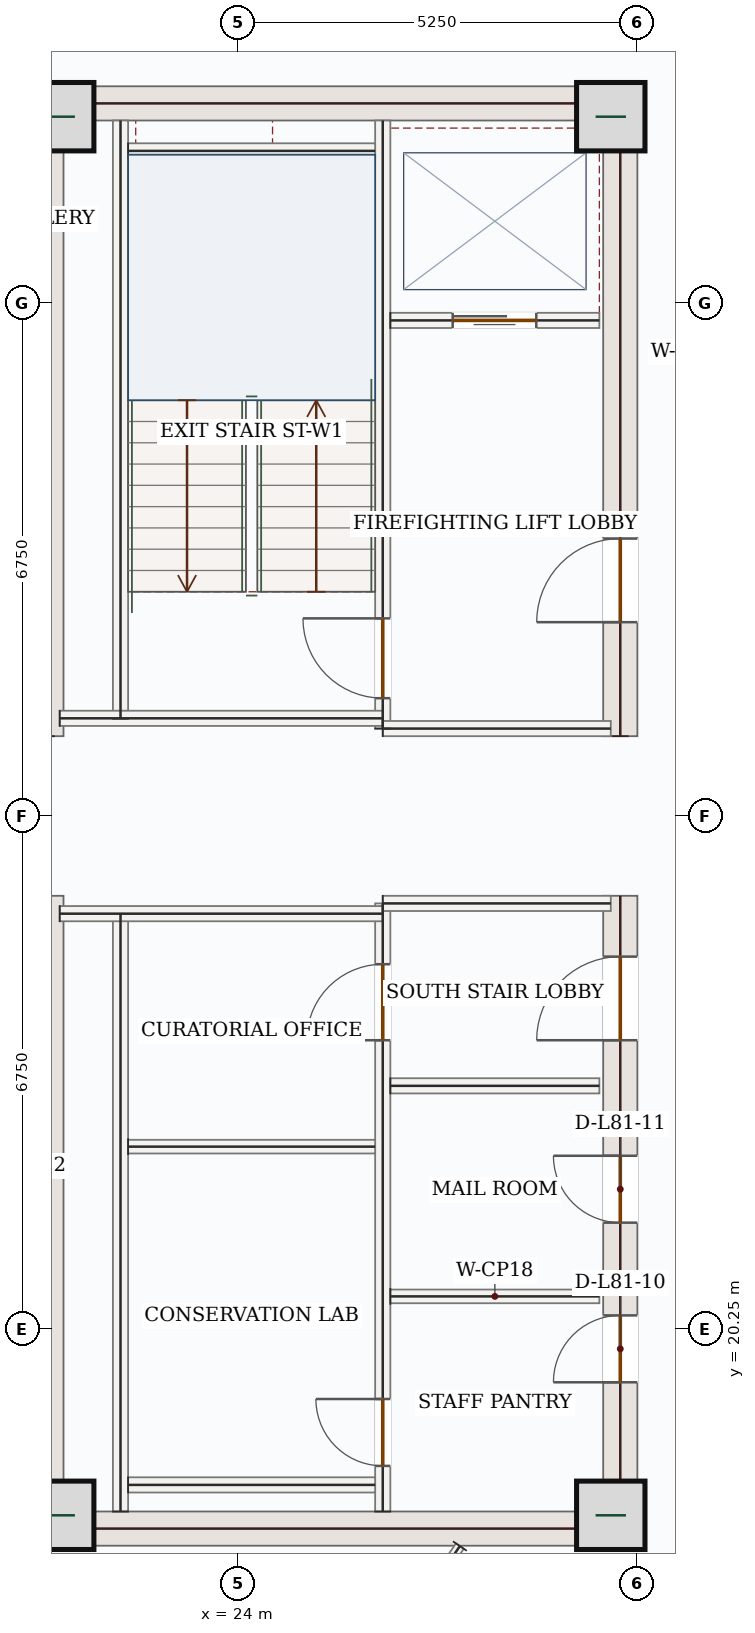
"""IFC4 building model, lengths in metres.
Left out: names, types, materials, properties, quantities, classifications, styles, units other than length and angle.
Written with IfcOpenShell. Run it as: python <this file> out.ifc"""

import sys

from ifc_helpers import new_model, si_unit, direction, frame, frame_2d, origin, origin_2d, place, context, subcontext, project, spatial, rectangle, extrude, source, transform, mapped, element, fill, save


model = new_model("IFC4")
c1 = context("Model", 3, precision=1e-05, world=origin(), true_north=direction((0.0, 1.0)))
c2 = subcontext(c1, "Body", "Model", "MODEL_VIEW")
j1 = project(units=[si_unit("LENGTHUNIT", "METRE"), si_unit("PLANEANGLEUNIT", "RADIAN")], contexts=[c1])
p1 = place(None, origin())
s1 = spatial("IfcSite", under=j1, at=p1, CompositionType="ELEMENT")
p2 = place(p1, origin())
s2 = spatial("IfcBuilding", under=s1, at=p2, CompositionType="ELEMENT")
p3 = place(p2, frame((0.0, 0.0, 334.8)))
s3 = spatial("IfcBuildingStorey", under=s2, at=p3, CompositionType="ELEMENT", Elevation=334.8)
m1 = source(origin(), c2, "Body", "SweptSolid", [
    extrude(rectangle(XDim=8.55, YDim=0.45, at=frame_2d((4.275, 0.0))), origin(), (0.0, 0.0, 1.0), 3.5),
])
for number, where, z_axis, x_axis in (
    (1, (21.475, 17.4, 0.0), (0.0, 0.0, 1.0), (0.0, 1.0, 0.0)),
    (2, (21.475, 28.05, 0.0), (0.0, 0.0, 1.0), (0.0, 1.0, 0.0)),
):
    element("IfcWall", number, at=place(p3, frame(where, z_axis=z_axis, x_axis=x_axis)), inside=s3, PredefinedType="SHEAR", context=c2, shape_type="MappedRepresentation", body=[
        mapped(m1, transform((0.0, 0.0, 0.0), x_axis=(1.0, 0.0, 0.0), y_axis=(0.0, 1.0, 0.0), z_axis=(0.0, 0.0, 1.0), scale=1.0)),
    ])
p4 = place(p3, frame((29.025, 17.4, 0.0), z_axis=(0.0, 0.0, 1.0), x_axis=(0.0, 1.0, 0.0)))
e3 = element("IfcWall", 3, at=p4, inside=s3, PredefinedType="SHEAR", context=c2, shape_type="SweptSolid", body=[
    extrude(rectangle(XDim=8.55, YDim=0.45, at=frame_2d((4.275, 0.0))), origin(), (0.0, 0.0, 1.0), 3.5),
])
p5 = place(p4, frame((6.65, 0.0, 0.0)))
e4 = element("IfcOpeningElement", 4, at=p5, cuts=e3, PredefinedType="OPENING", context=c2, shape_type="SweptSolid", body=[
    extrude(rectangle(XDim=1.1, YDim=2.2, at=frame_2d((0.55, 1.1))), frame((0.0, 0.235, 0.0), z_axis=(0.0, -1.0, 0.0), x_axis=(1.0, 0.0, 0.0)), (0.0, 0.0, 1.0), 0.47),
])
p6 = place(p4, frame((2.15, 0.0, 0.0)))
e5 = element("IfcOpeningElement", 5, at=p6, cuts=e3, PredefinedType="OPENING", context=c2, shape_type="SweptSolid", body=[
    extrude(rectangle(XDim=0.88, YDim=2.1, at=frame_2d((0.44, 1.05))), frame((0.0, 0.235, 0.0), z_axis=(0.0, -1.0, 0.0), x_axis=(1.0, 0.0, 0.0)), (0.0, 0.0, 1.0), 0.47),
])
p7 = place(p4, frame((4.25, 0.0, 0.0)))
e6 = element("IfcOpeningElement", 6, at=p7, cuts=e3, PredefinedType="OPENING", context=c2, shape_type="SweptSolid", body=[
    extrude(rectangle(XDim=0.88, YDim=2.1, at=frame_2d((0.44, 1.05))), frame((0.0, 0.235, 0.0), z_axis=(0.0, -1.0, 0.0), x_axis=(1.0, 0.0, 0.0)), (0.0, 0.0, 1.0), 0.47),
])
p8 = place(p3, frame((29.025, 28.05, 0.0), z_axis=(0.0, 0.0, 1.0), x_axis=(0.0, 1.0, 0.0)))
e7 = element("IfcWall", 7, at=p8, inside=s3, PredefinedType="SHEAR", context=c2, shape_type="SweptSolid", body=[
    extrude(rectangle(XDim=8.55, YDim=0.45, at=frame_2d((4.275, 0.0))), origin(), (0.0, 0.0, 1.0), 3.5),
])
p9 = place(p8, frame((1.5, 0.0, 0.0)))
e8 = element("IfcOpeningElement", 8, at=p9, cuts=e7, PredefinedType="OPENING", context=c2, shape_type="SweptSolid", body=[
    extrude(rectangle(XDim=1.1, YDim=2.2, at=frame_2d((0.55, 1.1))), frame((0.0, 0.235, 0.0), z_axis=(0.0, -1.0, 0.0), x_axis=(1.0, 0.0, 0.0)), (0.0, 0.0, 1.0), 0.47),
])
m2 = source(origin(), c2, "Body", "SweptSolid", [
    extrude(rectangle(XDim=7.1, YDim=0.45, at=frame_2d((3.55, 0.0))), origin(), (0.0, 0.0, 1.0), 3.5),
])
for number, where, z_axis, x_axis in (
    (9, (21.7, 17.625, 0.0), (0.0, 0.0, 1.0), (1.0, 0.0, 0.0)),
    (10, (21.7, 36.375, 0.0), (0.0, 0.0, 1.0), (1.0, 0.0, 0.0)),
):
    element("IfcWall", number, at=place(p3, frame(where, z_axis=z_axis, x_axis=x_axis)), inside=s3, PredefinedType="SHEAR", context=c2, shape_type="MappedRepresentation", body=[
        mapped(m2, transform((0.0, 0.0, 0.0), x_axis=(1.0, 0.0, 0.0), y_axis=(0.0, 1.0, 0.0), z_axis=(0.0, 0.0, 1.0), scale=1.0)),
    ])
m3 = source(origin(), c2, "Body", "SweptSolid", [
    extrude(rectangle(XDim=0.9, YDim=0.9, at=origin_2d()), origin(), (0.0, 0.0, 1.0), 3.75),
])
for number, where, z_axis, x_axis in (
    (11, (21.65, 17.8, 0.0), (0.0, 0.0, 1.0), (1.0, 0.0, 0.0)),
    (12, (28.9, 17.8, 0.0), (0.0, 0.0, 1.0), (1.0, 0.0, 0.0)),
    (13, (21.65, 36.2, 0.0), (0.0, 0.0, 1.0), (1.0, 0.0, 0.0)),
    (14, (28.9, 36.2, 0.0), (0.0, 0.0, 1.0), (1.0, 0.0, 0.0)),
):
    element("IfcColumn", number, at=place(p3, frame(where, z_axis=z_axis, x_axis=x_axis)), inside=s3, PredefinedType="COLUMN", context=c2, shape_type="MappedRepresentation", body=[
        mapped(m3, transform((0.0, 0.0, 0.0), x_axis=(1.0, 0.0, 0.0), y_axis=(0.0, 1.0, 0.0), z_axis=(0.0, 0.0, 1.0), scale=1.0)),
    ])
m4 = source(origin(), c2, "Body", "SweptSolid", [
    extrude(rectangle(XDim=3.709, YDim=0.28, at=frame_2d((1.855, 0.0))), origin(), (0.0, 0.0, 1.0), 3.5),
])
p10 = place(p3, frame((18.94, 35.542, 0.0), z_axis=(0.0, 0.0, 1.0), x_axis=(0.707106781187, 0.707106781187, 0.0)))
e15 = element("IfcWall", 15, at=p10, inside=s3, PredefinedType="SOLIDWALL", context=c2, shape_type="MappedRepresentation", body=[
    mapped(m4, transform((0.0, 0.0, 0.0), x_axis=(1.0, 0.0, 0.0), y_axis=(0.0, 1.0, 0.0), z_axis=(0.0, 0.0, 1.0), scale=1.0)),
])
m5 = source(origin(), c2, "Body", "SweptSolid", [
    extrude(rectangle(XDim=7.87, YDim=0.2, at=frame_2d((3.935, 0.0))), origin(), (0.0, 0.0, 1.0), 3.5),
])
for number, where, z_axis, x_axis in (
    (16, (22.45, 17.85, 0.0), (0.0, 0.0, 1.0), (0.0, 1.0, 0.0)),
    (17, (22.45, 28.28, 0.0), (0.0, 0.0, 1.0), (0.0, 1.0, 0.0)),
):
    element("IfcWall", number, at=place(p3, frame(where, z_axis=z_axis, x_axis=x_axis)), inside=s3, PredefinedType="SOLIDWALL", context=c2, shape_type="MappedRepresentation", body=[
        mapped(m5, transform((0.0, 0.0, 0.0), x_axis=(1.0, 0.0, 0.0), y_axis=(0.0, 1.0, 0.0), z_axis=(0.0, 0.0, 1.0), scale=1.0)),
    ])
p11 = place(p3, frame((25.9, 17.85, 0.0), z_axis=(0.0, 0.0, 1.0), x_axis=(0.0, 1.0, 0.0)))
e18 = element("IfcWall", 18, at=p11, inside=s3, PredefinedType="SOLIDWALL", context=c2, shape_type="SweptSolid", body=[
    extrude(rectangle(XDim=8.0, YDim=0.2, at=frame_2d((4.0, 0.0))), origin(), (0.0, 0.0, 1.0), 3.5),
])
p12 = place(p11, frame((6.2, 0.0, 0.0)))
e19 = element("IfcOpeningElement", 19, at=p12, cuts=e18, PredefinedType="OPENING", context=c2, shape_type="SweptSolid", body=[
    extrude(rectangle(XDim=1.0, YDim=2.15, at=frame_2d((0.5, 1.075))), frame((0.0, 0.11, 0.0), z_axis=(0.0, -1.0, 0.0), x_axis=(1.0, 0.0, 0.0)), (0.0, 0.0, 1.0), 0.22),
])
p13 = place(p11, frame((0.6, 0.0, 0.0)))
e20 = element("IfcOpeningElement", 20, at=p13, cuts=e18, PredefinedType="OPENING", context=c2, shape_type="SweptSolid", body=[
    extrude(rectangle(XDim=0.88, YDim=2.1, at=frame_2d((0.44, 1.05))), frame((0.0, 0.11, 0.0), z_axis=(0.0, -1.0, 0.0), x_axis=(1.0, 0.0, 0.0)), (0.0, 0.0, 1.0), 0.22),
])
p14 = place(p3, frame((25.9, 28.15, 0.0), z_axis=(0.0, 0.0, 1.0), x_axis=(0.0, 1.0, 0.0)))
e21 = element("IfcWall", 21, at=p14, inside=s3, PredefinedType="SOLIDWALL", context=c2, shape_type="SweptSolid", body=[
    extrude(rectangle(XDim=8.0, YDim=0.2, at=frame_2d((4.0, 0.0))), origin(), (0.0, 0.0, 1.0), 3.5),
])
p15 = place(p14, frame((0.4, 0.0, 0.0)))
e22 = element("IfcOpeningElement", 22, at=p15, cuts=e21, PredefinedType="OPENING", context=c2, shape_type="SweptSolid", body=[
    extrude(rectangle(XDim=1.05, YDim=2.15, at=frame_2d((0.525, 1.075))), frame((0.0, 0.11, 0.0), z_axis=(0.0, -1.0, 0.0), x_axis=(1.0, 0.0, 0.0)), (0.0, 0.0, 1.0), 0.22),
])
m6 = source(origin(), c2, "Body", "SweptSolid", [
    extrude(rectangle(XDim=4.25, YDim=0.2, at=frame_2d((2.125, 0.0))), origin(), (0.0, 0.0, 1.0), 3.5),
])
p16 = place(p3, frame((21.65, 25.715, 0.0), z_axis=(0.0, 0.0, 1.0), x_axis=(1.0, 0.0, 0.0)))
e23 = element("IfcWall", 23, at=p16, inside=s3, PredefinedType="SOLIDWALL", context=c2, shape_type="MappedRepresentation", body=[
    mapped(m6, transform((0.0, 0.0, 0.0), x_axis=(1.0, 0.0, 0.0), y_axis=(0.0, 1.0, 0.0), z_axis=(0.0, 0.0, 1.0), scale=1.0)),
])
m7 = source(origin(), c2, "Body", "SweptSolid", [
    extrude(rectangle(XDim=3.0, YDim=0.2, at=frame_2d((1.5, 0.0))), origin(), (0.0, 0.0, 1.0), 3.5),
])
p17 = place(p3, frame((25.9, 25.85, 0.0), z_axis=(0.0, 0.0, 1.0), x_axis=(1.0, 0.0, 0.0)))
e24 = element("IfcWall", 24, at=p17, inside=s3, PredefinedType="SOLIDWALL", context=c2, shape_type="MappedRepresentation", body=[
    mapped(m7, transform((0.0, 0.0, 0.0), x_axis=(1.0, 0.0, 0.0), y_axis=(0.0, 1.0, 0.0), z_axis=(0.0, 0.0, 1.0), scale=1.0)),
])
p18 = place(p3, frame((21.65, 28.285, 0.0), z_axis=(0.0, 0.0, 1.0), x_axis=(1.0, 0.0, 0.0)))
e25 = element("IfcWall", 25, at=p18, inside=s3, PredefinedType="SOLIDWALL", context=c2, shape_type="MappedRepresentation", body=[
    mapped(m6, transform((0.0, 0.0, 0.0), x_axis=(1.0, 0.0, 0.0), y_axis=(0.0, 1.0, 0.0), z_axis=(0.0, 0.0, 1.0), scale=1.0)),
])
p19 = place(p3, frame((25.9, 28.15, 0.0), z_axis=(0.0, 0.0, 1.0), x_axis=(1.0, 0.0, 0.0)))
e26 = element("IfcWall", 26, at=p19, inside=s3, PredefinedType="SOLIDWALL", context=c2, shape_type="MappedRepresentation", body=[
    mapped(m7, transform((0.0, 0.0, 0.0), x_axis=(1.0, 0.0, 0.0), y_axis=(0.0, 1.0, 0.0), z_axis=(0.0, 0.0, 1.0), scale=1.0)),
])
m8 = source(origin(), c2, "Body", "SweptSolid", [
    extrude(rectangle(XDim=3.25, YDim=0.2, at=frame_2d((1.625, 0.0))), origin(), (0.0, 0.0, 1.0), 3.5),
])
for number, where, z_axis, x_axis in (
    (27, (22.55, 35.75, 0.0), (0.0, 0.0, 1.0), (1.0, 0.0, 0.0)),
    (28, (22.55, 18.2, 0.0), (0.0, 0.0, 1.0), (1.0, 0.0, 0.0)),
):
    element("IfcWall", number, at=place(p3, frame(where, z_axis=z_axis, x_axis=x_axis)), inside=s3, PredefinedType="SOLIDWALL", context=c2, shape_type="MappedRepresentation", body=[
        mapped(m8, transform((0.0, 0.0, 0.0), x_axis=(1.0, 0.0, 0.0), y_axis=(0.0, 1.0, 0.0), z_axis=(0.0, 0.0, 1.0), scale=1.0)),
    ])
m9 = source(origin(), c2, "Body", "SweptSolid", [
    extrude(rectangle(XDim=3.25, YDim=0.18, at=frame_2d((1.625, 0.0))), origin(), (0.0, 0.0, 1.0), 3.5),
])
p20 = place(p3, frame((22.55, 22.65, 0.0), z_axis=(0.0, 0.0, 1.0), x_axis=(1.0, 0.0, 0.0)))
e29 = element("IfcWall", 29, at=p20, inside=s3, PredefinedType="PARTITIONING", context=c2, shape_type="MappedRepresentation", body=[
    mapped(m9, transform((0.0, 0.0, 0.0), x_axis=(1.0, 0.0, 0.0), y_axis=(0.0, 1.0, 0.0), z_axis=(0.0, 0.0, 1.0), scale=1.0)),
])
p21 = place(p3, frame((26.0, 33.52, 0.0), z_axis=(0.0, 0.0, 1.0), x_axis=(1.0, 0.0, 0.0)))
e30 = element("IfcWall", 30, at=p21, inside=s3, PredefinedType="SOLIDWALL", context=c2, shape_type="SweptSolid", body=[
    extrude(rectangle(XDim=2.75, YDim=0.2, at=frame_2d((1.375, 0.0))), origin(), (0.0, 0.0, 1.0), 3.5),
])
p22 = place(p21, frame((0.82, 0.0, 0.0)))
e31 = element("IfcOpeningElement", 31, at=p22, cuts=e30, PredefinedType="OPENING", context=c2, shape_type="SweptSolid", body=[
    extrude(rectangle(XDim=1.1, YDim=2.15, at=frame_2d((0.55, 1.075))), frame((0.0, 0.11, 0.0), z_axis=(0.0, -1.0, 0.0), x_axis=(1.0, 0.0, 0.0)), (0.0, 0.0, 1.0), 0.22),
])
m10 = source(origin(), c2, "Body", "SweptSolid", [
    extrude(rectangle(XDim=2.75, YDim=0.2, at=frame_2d((1.375, 0.0))), origin(), (0.0, 0.0, 1.0), 3.5),
])
p23 = place(p3, frame((26.0, 23.45, 0.0), z_axis=(0.0, 0.0, 1.0), x_axis=(1.0, 0.0, 0.0)))
e32 = element("IfcWall", 32, at=p23, inside=s3, PredefinedType="SOLIDWALL", context=c2, shape_type="MappedRepresentation", body=[
    mapped(m10, transform((0.0, 0.0, 0.0), x_axis=(1.0, 0.0, 0.0), y_axis=(0.0, 1.0, 0.0), z_axis=(0.0, 0.0, 1.0), scale=1.0)),
])
m11 = source(origin(), c2, "Body", "SweptSolid", [
    extrude(rectangle(XDim=2.75, YDim=0.18, at=frame_2d((1.375, 0.0))), origin(), (0.0, 0.0, 1.0), 3.5),
])
p24 = place(p3, frame((26.0, 20.68, 0.0), z_axis=(0.0, 0.0, 1.0), x_axis=(1.0, 0.0, 0.0)))
e33 = element("IfcWall", 33, at=p24, inside=s3, PredefinedType="PARTITIONING", context=c2, shape_type="MappedRepresentation", body=[
    mapped(m11, transform((0.0, 0.0, 0.0), x_axis=(1.0, 0.0, 0.0), y_axis=(0.0, 1.0, 0.0), z_axis=(0.0, 0.0, 1.0), scale=1.0)),
])
m12 = source(origin(), c2, "Body", "SweptSolid", [
    extrude(rectangle(XDim=2.511, YDim=0.125, at=frame_2d((1.255, 0.0))), origin(), (0.0, 0.0, 1.0), 3.5),
])
p25 = place(p3, frame((26.915, 17.395, 0.0), z_axis=(0.0, 0.0, 1.0), x_axis=(-0.564980194272, -0.825104466162, 0.0)))
e34 = element("IfcWall", 34, at=p25, inside=s3, PredefinedType="PARTITIONING", context=c2, shape_type="MappedRepresentation", body=[
    mapped(m12, transform((0.0, 0.0, 0.0), x_axis=(1.0, 0.0, 0.0), y_axis=(0.0, 1.0, 0.0), z_axis=(0.0, 0.0, 1.0), scale=1.0)),
])
m13 = source(origin(), c2, "Body", "SweptSolid", [
    extrude(rectangle(XDim=1.05, YDim=2.15, at=frame_2d((0.525, 1.075))), frame((0.0, 0.025, 0.0), z_axis=(0.0, -1.0, 0.0), x_axis=(1.0, 0.0, 0.0)), (0.0, 0.0, 1.0), 0.05),
])
p26 = place(p15, origin())
e35 = element("IfcDoor", 35, at=p26, inside=s3, OperationType="SINGLE_SWING_RIGHT", PredefinedType="DOOR", context=c2, shape_type="MappedRepresentation", body=[
    mapped(m13, transform((0.0, 0.0, 0.0), x_axis=(1.0, 0.0, 0.0), y_axis=(0.0, 1.0, 0.0), z_axis=(0.0, 0.0, 1.0), scale=1.0)),
])
fill(e22, e35)
m14 = source(origin(), c2, "Body", "SweptSolid", [
    extrude(rectangle(XDim=1.0, YDim=2.15, at=frame_2d((0.5, 1.075))), frame((0.0, 0.025, 0.0), z_axis=(0.0, -1.0, 0.0), x_axis=(1.0, 0.0, 0.0)), (0.0, 0.0, 1.0), 0.05),
])
p27 = place(p12, origin())
e36 = element("IfcDoor", 36, at=p27, inside=s3, OperationType="SINGLE_SWING_LEFT", PredefinedType="DOOR", context=c2, shape_type="MappedRepresentation", body=[
    mapped(m14, transform((0.0, 0.0, 0.0), x_axis=(1.0, 0.0, 0.0), y_axis=(0.0, 1.0, 0.0), z_axis=(0.0, 0.0, 1.0), scale=1.0)),
])
fill(e19, e36)
m15 = source(origin(), c2, "Body", "SweptSolid", [
    extrude(rectangle(XDim=0.88, YDim=2.1, at=frame_2d((0.44, 1.05))), frame((0.0, 0.025, 0.0), z_axis=(0.0, -1.0, 0.0), x_axis=(1.0, 0.0, 0.0)), (0.0, 0.0, 1.0), 0.05),
])
p28 = place(p13, origin())
e37 = element("IfcDoor", 37, at=p28, inside=s3, OperationType="SINGLE_SWING_RIGHT", PredefinedType="DOOR", context=c2, shape_type="MappedRepresentation", body=[
    mapped(m15, transform((0.0, 0.0, 0.0), x_axis=(1.0, 0.0, 0.0), y_axis=(0.0, 1.0, 0.0), z_axis=(0.0, 0.0, 1.0), scale=1.0)),
])
fill(e20, e37)
m16 = source(origin(), c2, "Body", "SweptSolid", [
    extrude(rectangle(XDim=1.1, YDim=2.15, at=frame_2d((0.55, 1.075))), frame((0.0, 0.025, 0.0), z_axis=(0.0, -1.0, 0.0), x_axis=(1.0, 0.0, 0.0)), (0.0, 0.0, 1.0), 0.05),
])
p29 = place(p22, origin())
e38 = element("IfcDoor", 38, at=p29, inside=s3, OperationType="DOUBLE_DOOR_SLIDING", PredefinedType="DOOR", context=c2, shape_type="MappedRepresentation", body=[
    mapped(m16, transform((0.0, 0.0, 0.0), x_axis=(1.0, 0.0, 0.0), y_axis=(0.0, 1.0, 0.0), z_axis=(0.0, 0.0, 1.0), scale=1.0)),
])
fill(e31, e38)
m17 = source(origin(), c2, "Body", "SweptSolid", [
    extrude(rectangle(XDim=1.1, YDim=2.2, at=frame_2d((0.55, 1.1))), frame((0.0, 0.025, 0.0), z_axis=(0.0, -1.0, 0.0), x_axis=(1.0, 0.0, 0.0)), (0.0, 0.0, 1.0), 0.05),
])
p30 = place(p9, origin())
e39 = element("IfcDoor", 39, at=p30, inside=s3, OperationType="SINGLE_SWING_LEFT", PredefinedType="DOOR", context=c2, shape_type="MappedRepresentation", body=[
    mapped(m17, transform((0.0, 0.0, 0.0), x_axis=(1.0, 0.0, 0.0), y_axis=(0.0, 1.0, 0.0), z_axis=(0.0, 0.0, 1.0), scale=1.0)),
])
fill(e8, e39)
p31 = place(p5, origin())
e40 = element("IfcDoor", 40, at=p31, inside=s3, OperationType="SINGLE_SWING_LEFT", PredefinedType="DOOR", context=c2, shape_type="MappedRepresentation", body=[
    mapped(m17, transform((0.0, 0.0, 0.0), x_axis=(1.0, 0.0, 0.0), y_axis=(0.0, 1.0, 0.0), z_axis=(0.0, 0.0, 1.0), scale=1.0)),
])
fill(e4, e40)
p32 = place(p6, origin())
e41 = element("IfcDoor", 41, at=p32, inside=s3, OperationType="SINGLE_SWING_LEFT", PredefinedType="DOOR", context=c2, shape_type="MappedRepresentation", body=[
    mapped(m15, transform((0.0, 0.0, 0.0), x_axis=(1.0, 0.0, 0.0), y_axis=(0.0, 1.0, 0.0), z_axis=(0.0, 0.0, 1.0), scale=1.0)),
])
fill(e5, e41)
p33 = place(p7, origin())
e42 = element("IfcDoor", 42, at=p33, inside=s3, OperationType="SINGLE_SWING_RIGHT", PredefinedType="DOOR", context=c2, shape_type="MappedRepresentation", body=[
    mapped(m15, transform((0.0, 0.0, 0.0), x_axis=(1.0, 0.0, 0.0), y_axis=(0.0, 1.0, 0.0), z_axis=(0.0, 0.0, 1.0), scale=1.0)),
])
fill(e6, e42)
save(model, sys.argv[1])
